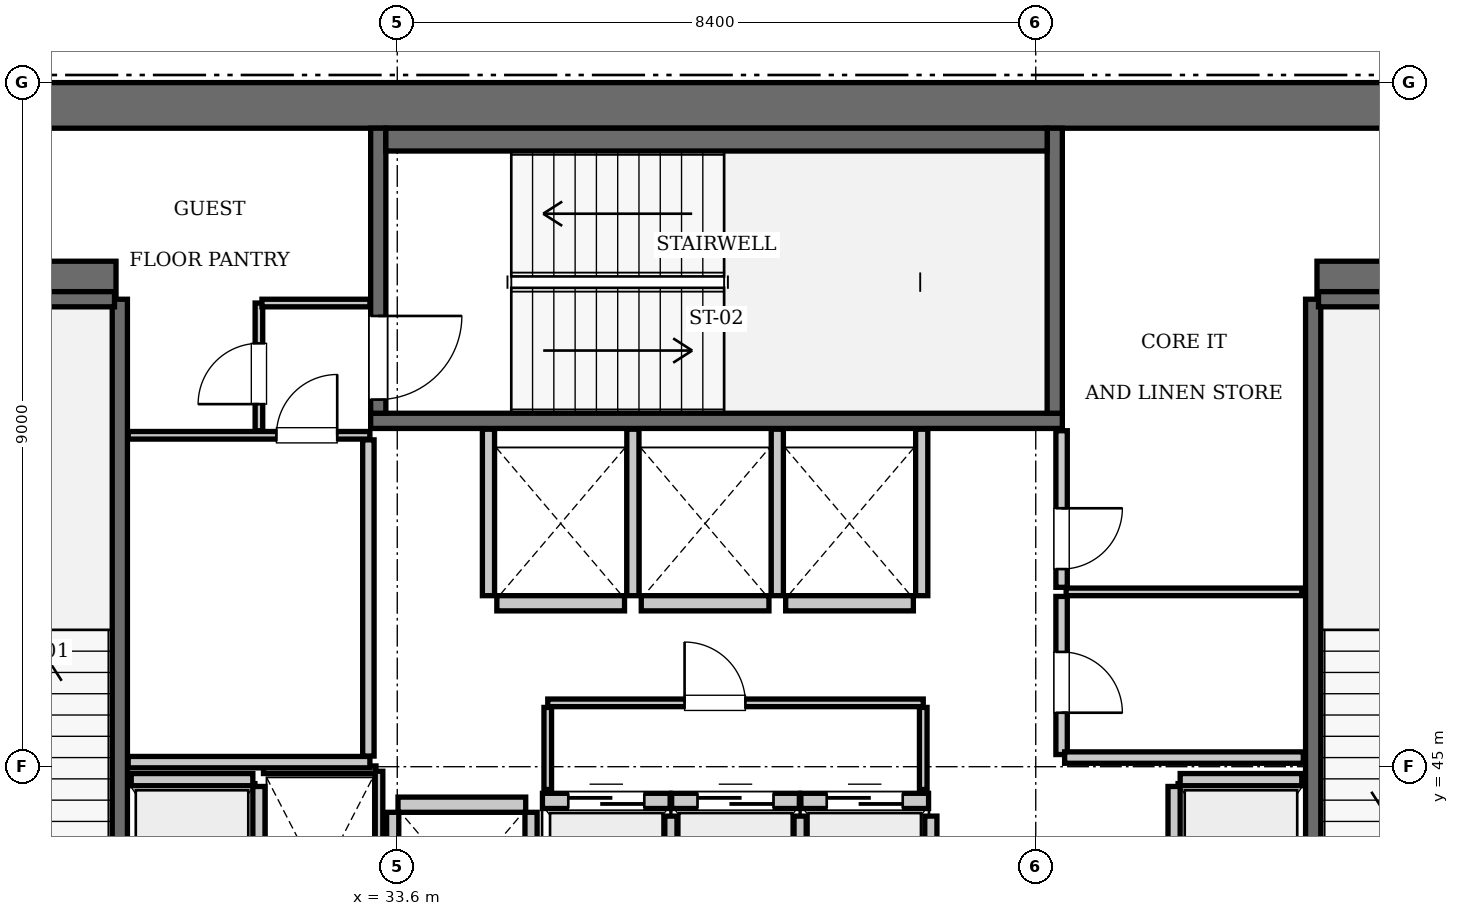
"""IFC4 building model, lengths in metres.
Left out: names, types, materials, properties, quantities, classifications, styles, units other than length and angle.
Written with IfcOpenShell. Run it as: python <this file> out.ifc"""

import sys

from ifc_helpers import new_model, si_unit, direction, frame, frame_2d, origin, place, context, subcontext, project, spatial, rectangle, extrude, element, fill, save


model = new_model("IFC4")
c1 = context("Model", 3, precision=1e-05, world=origin(), true_north=direction((0.0, 1.0)))
c2 = subcontext(c1, "Body", "Model", "MODEL_VIEW")
j1 = project(units=[si_unit("LENGTHUNIT", "METRE"), si_unit("PLANEANGLEUNIT", "RADIAN")], contexts=[c1])
p1 = place(None, origin())
s1 = spatial("IfcSite", under=j1, at=p1, CompositionType="ELEMENT")
p2 = place(p1, origin())
s2 = spatial("IfcBuilding", under=s1, at=p2, CompositionType="ELEMENT")
p3 = place(p2, frame((0.0, 0.0, 281.75)))
s3 = spatial("IfcBuildingStorey", under=s2, at=p3, CompositionType="ELEMENT", Elevation=281.75)
p4 = place(p3, frame((25.2, 53.7, 0.0), z_axis=(0.0, 0.0, 1.0), x_axis=(1.0, 0.0, 0.0)))
e1 = element("IfcWall", 1, at=p4, inside=s3, PredefinedType="SHEAR", context=c2, shape_type="SweptSolid", body=[
    extrude(rectangle(XDim=25.2, YDim=0.6, at=frame_2d((12.6, 0.0))), origin(), (0.0, 0.0, 1.0), 3.85),
])
p5 = place(p3, frame((25.8, 51.4, 0.0), z_axis=(0.0, 0.0, 1.0), x_axis=(1.0, 0.0, 0.0)))
e2 = element("IfcWall", 2, at=p5, inside=s3, PredefinedType="SHEAR", context=c2, shape_type="SweptSolid", body=[
    extrude(rectangle(XDim=4.1, YDim=0.5, at=frame_2d((2.05, 0.0))), origin(), (0.0, 0.0, 1.0), 3.85),
])
p6 = place(p3, frame((45.7, 51.4, 0.0), z_axis=(0.0, 0.0, 1.0), x_axis=(1.0, 0.0, 0.0)))
e3 = element("IfcWall", 3, at=p6, inside=s3, PredefinedType="SHEAR", context=c2, shape_type="SweptSolid", body=[
    extrude(rectangle(XDim=4.1, YDim=0.5, at=frame_2d((2.05, 0.0))), origin(), (0.0, 0.0, 1.0), 3.85),
])
p7 = place(p3, frame((29.95, 42.0, 0.0), z_axis=(0.0, 0.0, 1.0), x_axis=(0.0, 1.0, 0.0)))
e4 = element("IfcWall", 4, at=p7, inside=s3, PredefinedType="SOLIDWALL", context=c2, shape_type="SweptSolid", body=[
    extrude(rectangle(XDim=9.15, YDim=0.2, at=frame_2d((4.575, 0.0))), origin(), (0.0, 0.0, 1.0), 3.61),
])
p8 = place(p3, frame((26.38, 51.15, 0.0), z_axis=(0.0, 0.0, 1.0), x_axis=(1.0, 0.0, 0.0)))
e5 = element("IfcWall", 5, at=p8, inside=s3, PredefinedType="SOLIDWALL", context=c2, shape_type="SweptSolid", body=[
    extrude(rectangle(XDim=3.5, YDim=0.2, at=frame_2d((1.75, 0.0))), origin(), (0.0, 0.0, 1.0), 3.61),
])
p9 = place(p3, frame((33.25, 49.55, 0.0), z_axis=(0.0, 0.0, 1.0), x_axis=(1.0, 0.0, 0.0)))
e6 = element("IfcWall", 6, at=p9, inside=s3, PredefinedType="SOLIDWALL", context=c2, shape_type="SweptSolid", body=[
    extrude(rectangle(XDim=9.1, YDim=0.2, at=frame_2d((4.55, 0.0))), origin(), (0.0, 0.0, 1.0), 3.61),
])
p10 = place(p3, frame((42.25, 49.65, 0.0), z_axis=(0.0, 0.0, 1.0), x_axis=(0.0, 1.0, 0.0)))
e7 = element("IfcWall", 7, at=p10, inside=s3, PredefinedType="SOLIDWALL", context=c2, shape_type="SweptSolid", body=[
    extrude(rectangle(XDim=3.75, YDim=0.2, at=frame_2d((1.875, 0.0))), origin(), (0.0, 0.0, 1.0), 3.61),
])
p11 = place(p3, frame((33.35, 49.65, 0.0), z_axis=(0.0, 0.0, 1.0), x_axis=(0.0, 1.0, 0.0)))
e8 = element("IfcWall", 8, at=p11, inside=s3, PredefinedType="SOLIDWALL", context=c2, shape_type="SweptSolid", body=[
    extrude(rectangle(XDim=3.75, YDim=0.2, at=frame_2d((1.875, 0.0))), origin(), (0.0, 0.0, 1.0), 3.61),
])
p12 = place(p11, frame((0.18, 0.0, 0.0)))
e9 = element("IfcOpeningElement", 9, at=p12, cuts=e8, PredefinedType="OPENING", context=c2, shape_type="SweptSolid", body=[
    extrude(rectangle(XDim=1.1, YDim=2.15, at=frame_2d((0.55, 1.075))), frame((0.0, 0.11, 0.0), z_axis=(0.0, -1.0, 0.0), x_axis=(1.0, 0.0, 0.0)), (0.0, 0.0, 1.0), 0.22),
])
p13 = place(p3, frame((33.45, 53.25, 0.0), z_axis=(0.0, 0.0, 1.0), x_axis=(1.0, 0.0, 0.0)))
e10 = element("IfcWall", 10, at=p13, inside=s3, PredefinedType="SOLIDWALL", context=c2, shape_type="SweptSolid", body=[
    extrude(rectangle(XDim=8.7, YDim=0.3, at=frame_2d((4.35, 0.0))), origin(), (0.0, 0.0, 1.0), 3.61),
])
p14 = place(p3, frame((45.65, 42.0, 0.0), z_axis=(0.0, 0.0, 1.0), x_axis=(0.0, 1.0, 0.0)))
e11 = element("IfcWall", 11, at=p14, inside=s3, PredefinedType="SOLIDWALL", context=c2, shape_type="SweptSolid", body=[
    extrude(rectangle(XDim=9.15, YDim=0.2, at=frame_2d((4.575, 0.0))), origin(), (0.0, 0.0, 1.0), 3.61),
])
p15 = place(p3, frame((45.72, 51.15, 0.0), z_axis=(0.0, 0.0, 1.0), x_axis=(1.0, 0.0, 0.0)))
e12 = element("IfcWall", 12, at=p15, inside=s3, PredefinedType="SOLIDWALL", context=c2, shape_type="SweptSolid", body=[
    extrude(rectangle(XDim=3.5, YDim=0.2, at=frame_2d((1.75, 0.0))), origin(), (0.0, 0.0, 1.0), 3.61),
])
p16 = place(p3, frame((35.51, 44.55, 0.0), z_axis=(0.0, 0.0, 1.0), x_axis=(1.0, 0.0, 0.0)))
e13 = element("IfcWall", 13, at=p16, inside=s3, PredefinedType="SOLIDWALL", context=c2, shape_type="SweptSolid", body=[
    extrude(rectangle(XDim=1.68, YDim=0.2, at=frame_2d((0.84, 0.0))), origin(), (0.0, 0.0, 1.0), 3.61),
])
p17 = place(p16, frame((0.34, 0.0, 0.0)))
e14 = element("IfcOpeningElement", 14, at=p17, cuts=e13, PredefinedType="OPENING", context=c2, shape_type="SweptSolid", body=[
    extrude(rectangle(XDim=1.0, YDim=2.15, at=frame_2d((0.5, 1.075))), frame((0.0, 0.11, 0.0), z_axis=(0.0, -1.0, 0.0), x_axis=(1.0, 0.0, 0.0)), (0.0, 0.0, 1.0), 0.22),
])
p18 = place(p3, frame((37.21, 44.55, 0.0), z_axis=(0.0, 0.0, 1.0), x_axis=(1.0, 0.0, 0.0)))
e15 = element("IfcWall", 15, at=p18, inside=s3, PredefinedType="SOLIDWALL", context=c2, shape_type="SweptSolid", body=[
    extrude(rectangle(XDim=1.68, YDim=0.2, at=frame_2d((0.84, 0.0))), origin(), (0.0, 0.0, 1.0), 3.61),
])
p19 = place(p18, frame((0.34, 0.0, 0.0)))
e16 = element("IfcOpeningElement", 16, at=p19, cuts=e15, PredefinedType="OPENING", context=c2, shape_type="SweptSolid", body=[
    extrude(rectangle(XDim=1.0, YDim=2.15, at=frame_2d((0.5, 1.075))), frame((0.0, 0.11, 0.0), z_axis=(0.0, -1.0, 0.0), x_axis=(1.0, 0.0, 0.0)), (0.0, 0.0, 1.0), 0.22),
])
p20 = place(p3, frame((38.91, 44.55, 0.0), z_axis=(0.0, 0.0, 1.0), x_axis=(1.0, 0.0, 0.0)))
e17 = element("IfcWall", 17, at=p20, inside=s3, PredefinedType="SOLIDWALL", context=c2, shape_type="SweptSolid", body=[
    extrude(rectangle(XDim=1.68, YDim=0.2, at=frame_2d((0.84, 0.0))), origin(), (0.0, 0.0, 1.0), 3.61),
])
p21 = place(p20, frame((0.34, 0.0, 0.0)))
e18 = element("IfcOpeningElement", 18, at=p21, cuts=e17, PredefinedType="OPENING", context=c2, shape_type="SweptSolid", body=[
    extrude(rectangle(XDim=1.0, YDim=2.15, at=frame_2d((0.5, 1.075))), frame((0.0, 0.11, 0.0), z_axis=(0.0, -1.0, 0.0), x_axis=(1.0, 0.0, 0.0)), (0.0, 0.0, 1.0), 0.22),
])
p22 = place(p3, frame((34.91, 47.15, 0.0), z_axis=(0.0, 0.0, 1.0), x_axis=(1.0, 0.0, 0.0)))
e19 = element("IfcWall", 19, at=p22, inside=s3, PredefinedType="SOLIDWALL", context=c2, shape_type="SweptSolid", body=[
    extrude(rectangle(XDim=1.68, YDim=0.2, at=frame_2d((0.84, 0.0))), origin(), (0.0, 0.0, 1.0), 3.61),
])
for number, where, z_axis, x_axis in (
    (20, (36.81, 47.15, 0.0), (0.0, 0.0, 1.0), (1.0, 0.0, 0.0)),
    (21, (38.71, 47.15, 0.0), (0.0, 0.0, 1.0), (1.0, 0.0, 0.0)),
    (22, (33.61, 44.5, 0.0), (0.0, 0.0, 1.0), (1.0, 0.0, 0.0)),
):
    element("IfcWall", number, at=place(p3, frame(where, z_axis=z_axis, x_axis=x_axis)), inside=s3, PredefinedType="SOLIDWALL", context=c2, shape_type="SweptSolid", body=[
        extrude(rectangle(XDim=1.68, YDim=0.2, at=frame_2d((0.84, 0.0))), origin(), (0.0, 0.0, 1.0), 3.61),
    ])
p23 = place(p3, frame((30.1, 44.83, 0.0), z_axis=(0.0, 0.0, 1.0), x_axis=(1.0, 0.0, 0.0)))
e23 = element("IfcWall", 23, at=p23, inside=s3, PredefinedType="SOLIDWALL", context=c2, shape_type="SweptSolid", body=[
    extrude(rectangle(XDim=1.6, YDim=0.16, at=frame_2d((0.8, 0.0))), origin(), (0.0, 0.0, 1.0), 3.61),
])
p24 = place(p3, frame((31.78, 42.0, 0.0), z_axis=(0.0, 0.0, 1.0), x_axis=(0.0, 1.0, 0.0)))
e24 = element("IfcWall", 24, at=p24, inside=s3, PredefinedType="SOLIDWALL", context=c2, shape_type="SweptSolid", body=[
    extrude(rectangle(XDim=2.74, YDim=0.16, at=frame_2d((1.37, 0.0))), origin(), (0.0, 0.0, 1.0), 3.61),
])
p25 = place(p3, frame((43.9, 44.83, 0.0), z_axis=(0.0, 0.0, 1.0), x_axis=(1.0, 0.0, 0.0)))
e25 = element("IfcWall", 25, at=p25, inside=s3, PredefinedType="SOLIDWALL", context=c2, shape_type="SweptSolid", body=[
    extrude(rectangle(XDim=1.6, YDim=0.16, at=frame_2d((0.8, 0.0))), origin(), (0.0, 0.0, 1.0), 3.61),
])
p26 = place(p3, frame((43.82, 42.0, 0.0), z_axis=(0.0, 0.0, 1.0), x_axis=(0.0, 1.0, 0.0)))
e26 = element("IfcWall", 26, at=p26, inside=s3, PredefinedType="SOLIDWALL", context=c2, shape_type="SweptSolid", body=[
    extrude(rectangle(XDim=2.74, YDim=0.16, at=frame_2d((1.37, 0.0))), origin(), (0.0, 0.0, 1.0), 3.61),
])
for number, where, z_axis, x_axis in (
    (27, (37.2, 42.0, 0.0), (0.0, 0.0, 1.0), (0.0, 1.0, 0.0)),
    (28, (38.9, 42.0, 0.0), (0.0, 0.0, 1.0), (0.0, 1.0, 0.0)),
    (29, (40.62, 42.0, 0.0), (0.0, 0.0, 1.0), (0.0, 1.0, 0.0)),
):
    element("IfcWall", number, at=place(p3, frame(where, z_axis=z_axis, x_axis=x_axis)), inside=s3, PredefinedType="SOLIDWALL", context=c2, shape_type="SweptSolid", body=[
        extrude(rectangle(XDim=2.35, YDim=0.16, at=frame_2d((1.175, 0.0))), origin(), (0.0, 0.0, 1.0), 3.61),
    ])
for number, where, z_axis, x_axis in (
    (30, (34.8, 47.25, 0.0), (0.0, 0.0, 1.0), (0.0, 1.0, 0.0)),
    (31, (36.7, 47.25, 0.0), (0.0, 0.0, 1.0), (0.0, 1.0, 0.0)),
    (32, (38.6, 47.25, 0.0), (0.0, 0.0, 1.0), (0.0, 1.0, 0.0)),
    (33, (40.5, 47.25, 0.0), (0.0, 0.0, 1.0), (0.0, 1.0, 0.0)),
):
    element("IfcWall", number, at=place(p3, frame(where, z_axis=z_axis, x_axis=x_axis)), inside=s3, PredefinedType="SOLIDWALL", context=c2, shape_type="SweptSolid", body=[
        extrude(rectangle(XDim=2.19, YDim=0.16, at=frame_2d((1.095, 0.0))), origin(), (0.0, 0.0, 1.0), 3.61),
    ])
for number, where, z_axis, x_axis in (
    (34, (33.54, 42.0, 0.0), (0.0, 0.0, 1.0), (0.0, 1.0, 0.0)),
    (35, (35.36, 42.0, 0.0), (0.0, 0.0, 1.0), (0.0, 1.0, 0.0)),
):
    element("IfcWall", number, at=place(p3, frame(where, z_axis=z_axis, x_axis=x_axis)), inside=s3, PredefinedType="SOLIDWALL", context=c2, shape_type="SweptSolid", body=[
        extrude(rectangle(XDim=2.4, YDim=0.16, at=frame_2d((1.2, 0.0))), origin(), (0.0, 0.0, 1.0), 3.61),
    ])
p27 = place(p3, frame((31.84, 44.96, 0.0), z_axis=(0.0, 0.0, 1.0), x_axis=(1.0, 0.0, 0.0)))
e36 = element("IfcWall", 36, at=p27, inside=s3, PredefinedType="PARTITIONING", context=c2, shape_type="SweptSolid", body=[
    extrude(rectangle(XDim=1.48, YDim=0.1, at=frame_2d((0.74, 0.0))), origin(), (0.0, 0.0, 1.0), 3.61),
])
p28 = place(p3, frame((33.36, 42.06, 0.0), z_axis=(0.0, 0.0, 1.0), x_axis=(0.0, 1.0, 0.0)))
e37 = element("IfcWall", 37, at=p28, inside=s3, PredefinedType="PARTITIONING", context=c2, shape_type="SweptSolid", body=[
    extrude(rectangle(XDim=2.88, YDim=0.1, at=frame_2d((1.44, 0.0))), origin(), (0.0, 0.0, 1.0), 3.61),
])
p29 = place(p3, frame((35.58, 45.84, 0.0), z_axis=(0.0, 0.0, 1.0), x_axis=(1.0, 0.0, 0.0)))
e38 = element("IfcWall", 38, at=p29, inside=s3, PredefinedType="PARTITIONING", context=c2, shape_type="SweptSolid", body=[
    extrude(rectangle(XDim=4.94, YDim=0.1, at=frame_2d((2.47, 0.0))), origin(), (0.0, 0.0, 1.0), 3.61),
])
p30 = place(p29, frame((1.8, 0.0, 0.0)))
e39 = element("IfcOpeningElement", 39, at=p30, cuts=e38, PredefinedType="OPENING", context=c2, shape_type="SweptSolid", body=[
    extrude(rectangle(XDim=0.8, YDim=2.05, at=frame_2d((0.4, 1.025))), frame((0.0, 0.06, 0.0), z_axis=(0.0, -1.0, 0.0), x_axis=(1.0, 0.0, 0.0)), (0.0, 0.0, 1.0), 0.12),
])
for number, where, z_axis, x_axis in (
    (40, (35.58, 44.7, 0.0), (0.0, 0.0, 1.0), (0.0, 1.0, 0.0)),
    (41, (40.52, 44.7, 0.0), (0.0, 0.0, 1.0), (0.0, 1.0, 0.0)),
):
    element("IfcWall", number, at=place(p3, frame(where, z_axis=z_axis, x_axis=x_axis)), inside=s3, PredefinedType="PARTITIONING", context=c2, shape_type="SweptSolid", body=[
        extrude(rectangle(XDim=1.08, YDim=0.1, at=frame_2d((0.54, 0.0))), origin(), (0.0, 0.0, 1.0), 3.61),
    ])
p31 = place(p3, frame((30.06, 45.06, 0.0), z_axis=(0.0, 0.0, 1.0), x_axis=(1.0, 0.0, 0.0)))
e42 = element("IfcWall", 42, at=p31, inside=s3, PredefinedType="PARTITIONING", context=c2, shape_type="SweptSolid", body=[
    extrude(rectangle(XDim=3.18, YDim=0.15, at=frame_2d((1.59, 0.0))), origin(), (0.0, 0.0, 1.0), 3.61),
])
p32 = place(p3, frame((33.22, 45.14, 0.0), z_axis=(0.0, 0.0, 1.0), x_axis=(0.0, 1.0, 0.0)))
e43 = element("IfcWall", 43, at=p32, inside=s3, PredefinedType="PARTITIONING", context=c2, shape_type="SweptSolid", body=[
    extrude(rectangle(XDim=4.16, YDim=0.15, at=frame_2d((2.08, 0.0))), origin(), (0.0, 0.0, 1.0), 3.61),
])
p33 = place(p3, frame((30.06, 49.36, 0.0), z_axis=(0.0, 0.0, 1.0), x_axis=(1.0, 0.0, 0.0)))
e44 = element("IfcWall", 44, at=p33, inside=s3, PredefinedType="PARTITIONING", context=c2, shape_type="SweptSolid", body=[
    extrude(rectangle(XDim=3.18, YDim=0.1, at=frame_2d((1.59, 0.0))), origin(), (0.0, 0.0, 1.0), 3.61),
])
p34 = place(p33, frame((1.95, 0.0, 0.0)))
e45 = element("IfcOpeningElement", 45, at=p34, cuts=e44, PredefinedType="OPENING", context=c2, shape_type="SweptSolid", body=[
    extrude(rectangle(XDim=0.8, YDim=2.05, at=frame_2d((0.4, 1.025))), frame((0.0, 0.06, 0.0), z_axis=(0.0, -1.0, 0.0), x_axis=(1.0, 0.0, 0.0)), (0.0, 0.0, 1.0), 0.12),
])
p35 = place(p3, frame((31.78, 49.42, 0.0), z_axis=(0.0, 0.0, 1.0), x_axis=(0.0, 1.0, 0.0)))
e46 = element("IfcWall", 46, at=p35, inside=s3, PredefinedType="PARTITIONING", context=c2, shape_type="SweptSolid", body=[
    extrude(rectangle(XDim=1.68, YDim=0.1, at=frame_2d((0.84, 0.0))), origin(), (0.0, 0.0, 1.0), 3.61),
])
p36 = place(p35, frame((0.35, 0.0, 0.0)))
e47 = element("IfcOpeningElement", 47, at=p36, cuts=e46, PredefinedType="OPENING", context=c2, shape_type="SweptSolid", body=[
    extrude(rectangle(XDim=0.8, YDim=2.05, at=frame_2d((0.4, 1.025))), frame((0.0, 0.06, 0.0), z_axis=(0.0, -1.0, 0.0), x_axis=(1.0, 0.0, 0.0)), (0.0, 0.0, 1.0), 0.12),
])
p37 = place(p3, frame((31.82, 51.1, 0.0), z_axis=(0.0, 0.0, 1.0), x_axis=(1.0, 0.0, 0.0)))
e48 = element("IfcWall", 48, at=p37, inside=s3, PredefinedType="PARTITIONING", context=c2, shape_type="SweptSolid", body=[
    extrude(rectangle(XDim=1.42, YDim=0.1, at=frame_2d((0.71, 0.0))), origin(), (0.0, 0.0, 1.0), 3.61),
])
p38 = place(p3, frame((42.34, 45.16, 0.0), z_axis=(0.0, 0.0, 1.0), x_axis=(0.0, 1.0, 0.0)))
e49 = element("IfcWall", 49, at=p38, inside=s3, PredefinedType="PARTITIONING", context=c2, shape_type="SweptSolid", body=[
    extrude(rectangle(XDim=2.08, YDim=0.15, at=frame_2d((1.04, 0.0))), origin(), (0.0, 0.0, 1.0), 3.61),
])
p39 = place(p38, frame((0.55, 0.0, 0.0)))
e50 = element("IfcOpeningElement", 50, at=p39, cuts=e49, PredefinedType="OPENING", context=c2, shape_type="SweptSolid", body=[
    extrude(rectangle(XDim=0.8, YDim=2.05, at=frame_2d((0.4, 1.025))), frame((0.0, 0.085, 0.0), z_axis=(0.0, -1.0, 0.0), x_axis=(1.0, 0.0, 0.0)), (0.0, 0.0, 1.0), 0.17),
])
p40 = place(p3, frame((42.34, 47.36, 0.0), z_axis=(0.0, 0.0, 1.0), x_axis=(0.0, 1.0, 0.0)))
e51 = element("IfcWall", 51, at=p40, inside=s3, PredefinedType="PARTITIONING", context=c2, shape_type="SweptSolid", body=[
    extrude(rectangle(XDim=2.06, YDim=0.15, at=frame_2d((1.03, 0.0))), origin(), (0.0, 0.0, 1.0), 3.61),
])
p41 = place(p40, frame((0.24, 0.0, 0.0)))
e52 = element("IfcOpeningElement", 52, at=p41, cuts=e51, PredefinedType="OPENING", context=c2, shape_type="SweptSolid", body=[
    extrude(rectangle(XDim=0.8, YDim=2.05, at=frame_2d((0.4, 1.025))), frame((0.0, 0.085, 0.0), z_axis=(0.0, -1.0, 0.0), x_axis=(1.0, 0.0, 0.0)), (0.0, 0.0, 1.0), 0.17),
])
p42 = place(p3, frame((42.4, 47.3, 0.0), z_axis=(0.0, 0.0, 1.0), x_axis=(1.0, 0.0, 0.0)))
e53 = element("IfcWall", 53, at=p42, inside=s3, PredefinedType="PARTITIONING", context=c2, shape_type="SweptSolid", body=[
    extrude(rectangle(XDim=3.1, YDim=0.1, at=frame_2d((1.55, 0.0))), origin(), (0.0, 0.0, 1.0), 3.61),
])
p43 = place(p3, frame((42.38, 45.12, 0.0), z_axis=(0.0, 0.0, 1.0), x_axis=(1.0, 0.0, 0.0)))
e54 = element("IfcWall", 54, at=p43, inside=s3, PredefinedType="PARTITIONING", context=c2, shape_type="SweptSolid", body=[
    extrude(rectangle(XDim=3.14, YDim=0.15, at=frame_2d((1.57, 0.0))), origin(), (0.0, 0.0, 1.0), 3.61),
])
p44 = place(p12, frame((1.1, 0.0, 0.0), z_axis=(0.0, 0.0, 1.0), x_axis=(-1.0, 0.0, 0.0)))
e55 = element("IfcDoor", 55, at=p44, inside=s3, OperationType="SINGLE_SWING_LEFT", PredefinedType="DOOR", context=c2, shape_type="SweptSolid", body=[
    extrude(rectangle(XDim=1.1, YDim=2.15, at=frame_2d((0.55, 1.075))), frame((0.0, 0.025, 0.0), z_axis=(0.0, -1.0, 0.0), x_axis=(1.0, 0.0, 0.0)), (0.0, 0.0, 1.0), 0.05),
])
fill(e9, e55)
p45 = place(p17, origin())
e56 = element("IfcDoor", 56, at=p45, inside=s3, OperationType="SLIDING_TO_LEFT", PredefinedType="DOOR", context=c2, shape_type="SweptSolid", body=[
    extrude(rectangle(XDim=1.0, YDim=2.15, at=frame_2d((0.5, 1.075))), frame((0.0, 0.025, 0.0), z_axis=(0.0, -1.0, 0.0), x_axis=(1.0, 0.0, 0.0)), (0.0, 0.0, 1.0), 0.05),
])
fill(e14, e56)
p46 = place(p19, origin())
e57 = element("IfcDoor", 57, at=p46, inside=s3, OperationType="SLIDING_TO_LEFT", PredefinedType="DOOR", context=c2, shape_type="SweptSolid", body=[
    extrude(rectangle(XDim=1.0, YDim=2.15, at=frame_2d((0.5, 1.075))), frame((0.0, 0.025, 0.0), z_axis=(0.0, -1.0, 0.0), x_axis=(1.0, 0.0, 0.0)), (0.0, 0.0, 1.0), 0.05),
])
fill(e16, e57)
p47 = place(p21, origin())
e58 = element("IfcDoor", 58, at=p47, inside=s3, OperationType="SLIDING_TO_LEFT", PredefinedType="DOOR", context=c2, shape_type="SweptSolid", body=[
    extrude(rectangle(XDim=1.0, YDim=2.15, at=frame_2d((0.5, 1.075))), frame((0.0, 0.025, 0.0), z_axis=(0.0, -1.0, 0.0), x_axis=(1.0, 0.0, 0.0)), (0.0, 0.0, 1.0), 0.05),
])
fill(e18, e58)
p48 = place(p30, origin())
e59 = element("IfcDoor", 59, at=p48, inside=s3, OperationType="SINGLE_SWING_LEFT", PredefinedType="DOOR", context=c2, shape_type="SweptSolid", body=[
    extrude(rectangle(XDim=0.8, YDim=2.05, at=frame_2d((0.4, 1.025))), frame((0.0, 0.025, 0.0), z_axis=(0.0, -1.0, 0.0), x_axis=(1.0, 0.0, 0.0)), (0.0, 0.0, 1.0), 0.05),
])
fill(e39, e59)
p49 = place(p34, origin())
e60 = element("IfcDoor", 60, at=p49, inside=s3, OperationType="SINGLE_SWING_RIGHT", PredefinedType="DOOR", context=c2, shape_type="SweptSolid", body=[
    extrude(rectangle(XDim=0.8, YDim=2.05, at=frame_2d((0.4, 1.025))), frame((0.0, 0.025, 0.0), z_axis=(0.0, -1.0, 0.0), x_axis=(1.0, 0.0, 0.0)), (0.0, 0.0, 1.0), 0.05),
])
fill(e45, e60)
p50 = place(p36, origin())
e61 = element("IfcDoor", 61, at=p50, inside=s3, OperationType="SINGLE_SWING_LEFT", PredefinedType="DOOR", context=c2, shape_type="SweptSolid", body=[
    extrude(rectangle(XDim=0.8, YDim=2.05, at=frame_2d((0.4, 1.025))), frame((0.0, 0.025, 0.0), z_axis=(0.0, -1.0, 0.0), x_axis=(1.0, 0.0, 0.0)), (0.0, 0.0, 1.0), 0.05),
])
fill(e47, e61)
p51 = place(p39, frame((0.8, 0.0, 0.0), z_axis=(0.0, 0.0, 1.0), x_axis=(-1.0, 0.0, 0.0)))
e62 = element("IfcDoor", 62, at=p51, inside=s3, OperationType="SINGLE_SWING_RIGHT", PredefinedType="DOOR", context=c2, shape_type="SweptSolid", body=[
    extrude(rectangle(XDim=0.8, YDim=2.05, at=frame_2d((0.4, 1.025))), frame((0.0, 0.025, 0.0), z_axis=(0.0, -1.0, 0.0), x_axis=(1.0, 0.0, 0.0)), (0.0, 0.0, 1.0), 0.05),
])
fill(e50, e62)
p52 = place(p41, frame((0.8, 0.0, 0.0), z_axis=(0.0, 0.0, 1.0), x_axis=(-1.0, 0.0, 0.0)))
e63 = element("IfcDoor", 63, at=p52, inside=s3, OperationType="SINGLE_SWING_LEFT", PredefinedType="DOOR", context=c2, shape_type="SweptSolid", body=[
    extrude(rectangle(XDim=0.8, YDim=2.05, at=frame_2d((0.4, 1.025))), frame((0.0, 0.025, 0.0), z_axis=(0.0, -1.0, 0.0), x_axis=(1.0, 0.0, 0.0)), (0.0, 0.0, 1.0), 0.05),
])
fill(e52, e63)
save(model, sys.argv[1])
